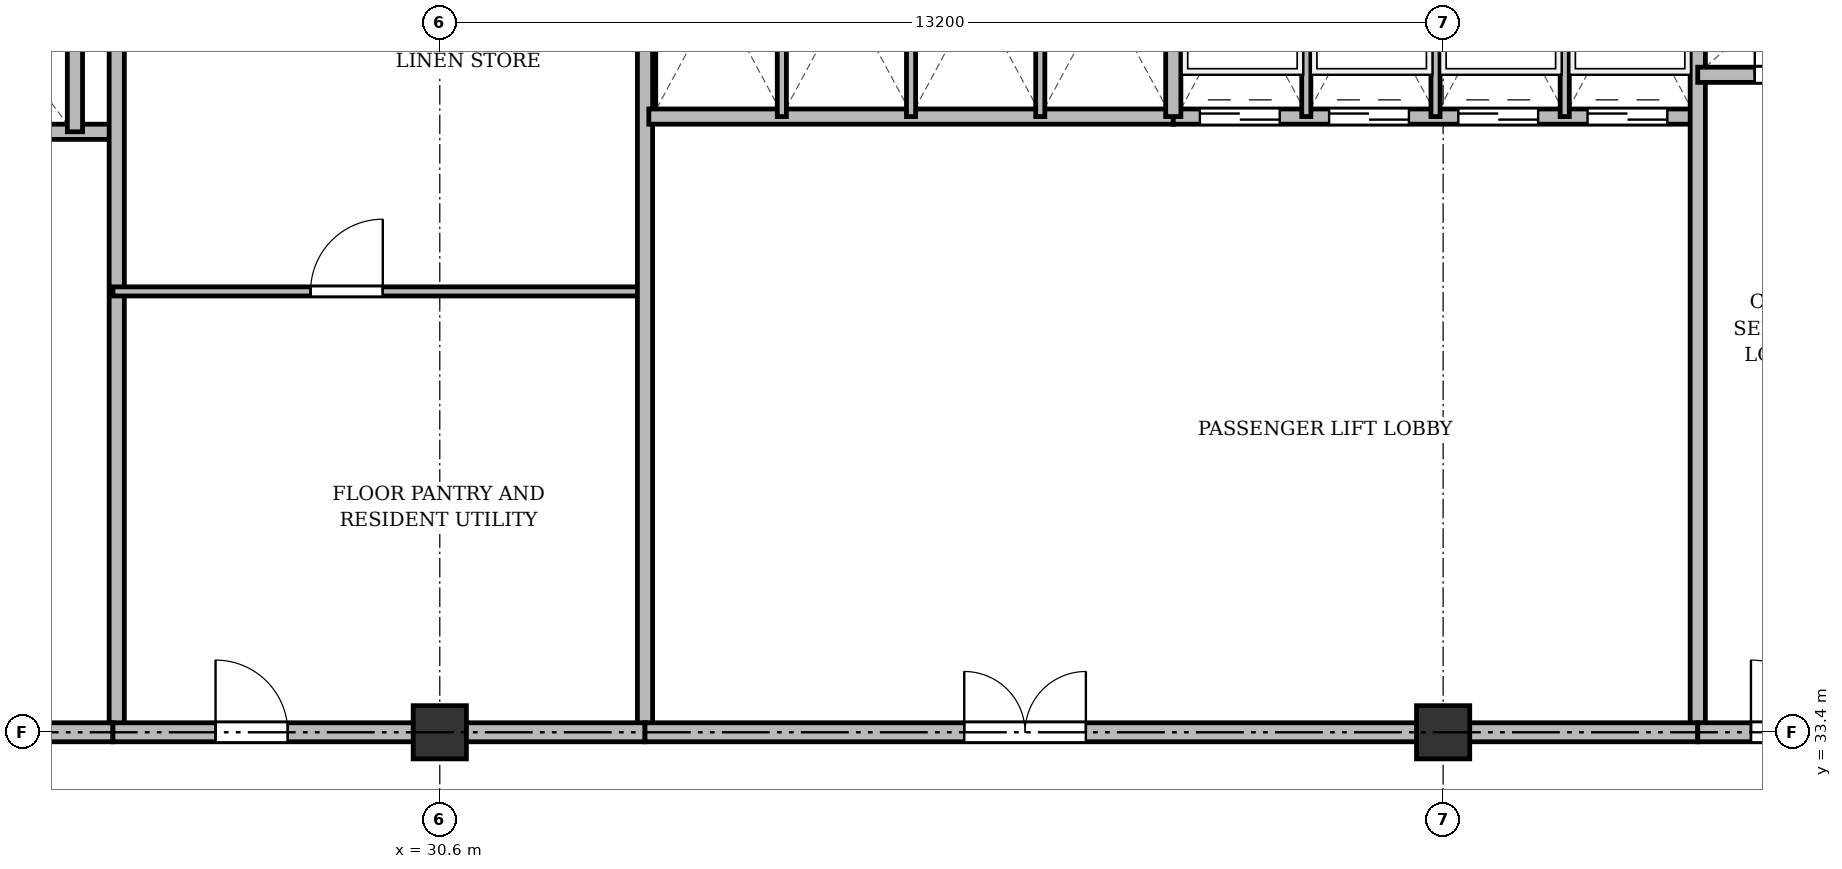
"""IFC4 building model, lengths in metres.
Left out: names, types, materials, properties, quantities, classifications, styles, units other than length and angle.
Written with IfcOpenShell. Run it as: python <this file> out.ifc"""

import sys

from ifc_helpers import new_model, si_unit, direction, frame, frame_2d, origin, origin_2d, place, context, subcontext, project, spatial, rectangle, extrude, source, transform, mapped, element, fill, save


model = new_model("IFC4")
c1 = context("Model", 3, precision=1e-05, world=origin(), true_north=direction((0.0, 1.0)))
c2 = subcontext(c1, "Body", "Model", "MODEL_VIEW")
j1 = project(units=[si_unit("LENGTHUNIT", "METRE"), si_unit("PLANEANGLEUNIT", "RADIAN")], contexts=[c1])
p1 = place(None, origin())
s1 = spatial("IfcSite", under=j1, at=p1, CompositionType="ELEMENT")
p2 = place(p1, origin())
s2 = spatial("IfcBuilding", under=s1, at=p2, CompositionType="ELEMENT")
p3 = place(p2, frame((0.0, 0.0, 219.3)))
s3 = spatial("IfcBuildingStorey", under=s2, at=p3, CompositionType="ELEMENT", Elevation=219.3)
m1 = source(origin(), c2, "Body", "SweptSolid", [
    extrude(rectangle(XDim=0.7, YDim=0.7, at=origin_2d()), origin(), (0.0, 0.0, 1.0), 3.6),
])
for number, where, z_axis, x_axis in (
    (1, (30.6, 33.4, 0.0), (0.0, 0.0, 1.0), (1.0, 0.0, 0.0)),
    (2, (43.8, 33.4, 0.0), (0.0, 0.0, 1.0), (1.0, 0.0, 0.0)),
):
    element("IfcColumn", number, at=place(p3, frame(where, z_axis=z_axis, x_axis=x_axis)), inside=s3, PredefinedType="COLUMN", context=c2, shape_type="MappedRepresentation", body=[
        mapped(m1, transform((0.0, 0.0, 0.0), x_axis=(1.0, 0.0, 0.0), y_axis=(0.0, 1.0, 0.0), z_axis=(0.0, 0.0, 1.0), scale=1.0)),
    ])
p4 = place(p3, frame((19.55, 41.3, 0.0), z_axis=(0.0, 0.0, 1.0), x_axis=(1.0, 0.0, 0.0)))
e3 = element("IfcWall", 3, at=p4, inside=s3, PredefinedType="SOLIDWALL", context=c2, shape_type="SweptSolid", body=[
    extrude(rectangle(XDim=6.75, YDim=0.2, at=frame_2d((3.375, 0.0))), origin(), (0.0, 0.0, 1.0), 3.36),
])
p5 = place(p4, frame((1.7, 0.0, 0.0)))
e4 = element("IfcOpeningElement", 4, at=p5, cuts=e3, PredefinedType="OPENING", context=c2, shape_type="SweptSolid", body=[
    extrude(rectangle(XDim=1.1, YDim=2.15, at=frame_2d((0.55, 1.075))), frame((0.0, 0.11, 0.0), z_axis=(0.0, -1.0, 0.0), x_axis=(1.0, 0.0, 0.0)), (0.0, 0.0, 1.0), 0.22),
])
p6 = place(p4, frame((4.4, 0.0, 0.0)))
e5 = element("IfcOpeningElement", 5, at=p6, cuts=e3, PredefinedType="OPENING", context=c2, shape_type="SweptSolid", body=[
    extrude(rectangle(XDim=1.1, YDim=2.15, at=frame_2d((0.55, 1.075))), frame((0.0, 0.11, 0.0), z_axis=(0.0, -1.0, 0.0), x_axis=(1.0, 0.0, 0.0)), (0.0, 0.0, 1.0), 0.22),
])
p7 = place(p3, frame((25.8, 41.3, 0.0), z_axis=(0.0, 0.0, 1.0), x_axis=(0.0, 1.0, 0.0)))
e6 = element("IfcWall", 6, at=p7, inside=s3, PredefinedType="SOLIDWALL", context=c2, shape_type="SweptSolid", body=[
    extrude(rectangle(XDim=3.4, YDim=0.2, at=frame_2d((1.7, 0.0))), origin(), (0.0, 0.0, 1.0), 3.36),
])
p8 = place(p3, frame((26.35, 33.4, 0.0), z_axis=(0.0, 0.0, 1.0), x_axis=(0.0, 1.0, 0.0)))
e7 = element("IfcWall", 7, at=p8, inside=s3, PredefinedType="SOLIDWALL", context=c2, shape_type="SweptSolid", body=[
    extrude(rectangle(XDim=11.3, YDim=0.2, at=frame_2d((5.65, 0.0))), origin(), (0.0, 0.0, 1.0), 2.91),
])
p9 = place(p3, frame((19.5, 33.4, 0.0), z_axis=(0.0, 0.0, 1.0), x_axis=(1.0, 0.0, 0.0)))
e8 = element("IfcWall", 8, at=p9, inside=s3, PredefinedType="PARTITIONING", context=c2, shape_type="SweptSolid", body=[
    extrude(rectangle(XDim=6.8, YDim=0.25, at=frame_2d((3.4, 0.0))), origin(), (0.0, 0.0, 1.0), 2.91),
])
p10 = place(p9, frame((0.75, 0.0, 0.0)))
e9 = element("IfcOpeningElement", 9, at=p10, cuts=e8, PredefinedType="OPENING", context=c2, shape_type="SweptSolid", body=[
    extrude(rectangle(XDim=1.6, YDim=2.2, at=frame_2d((0.8, 1.1))), frame((0.0, 0.135, 0.0), z_axis=(0.0, -1.0, 0.0), x_axis=(1.0, 0.0, 0.0)), (0.0, 0.0, 1.0), 0.27),
])
p11 = place(p3, frame((26.3, 39.2, 0.0), z_axis=(0.0, 0.0, 1.0), x_axis=(1.0, 0.0, 0.0)))
e10 = element("IfcWall", 10, at=p11, inside=s3, PredefinedType="PARTITIONING", context=c2, shape_type="SweptSolid", body=[
    extrude(rectangle(XDim=7.0, YDim=0.12, at=frame_2d((3.5, 0.0))), origin(), (0.0, 0.0, 1.0), 2.86),
])
p12 = place(p11, frame((2.6, 0.0, 0.0)))
e11 = element("IfcOpeningElement", 11, at=p12, cuts=e10, PredefinedType="OPENING", context=c2, shape_type="SweptSolid", body=[
    extrude(rectangle(XDim=0.95, YDim=2.15, at=frame_2d((0.475, 1.075))), frame((0.0, 0.07, 0.0), z_axis=(0.0, -1.0, 0.0), x_axis=(1.0, 0.0, 0.0)), (0.0, 0.0, 1.0), 0.14),
])
p13 = place(p3, frame((33.3, 33.4, 0.0), z_axis=(0.0, 0.0, 1.0), x_axis=(0.0, 1.0, 0.0)))
e12 = element("IfcWall", 12, at=p13, inside=s3, PredefinedType="SOLIDWALL", context=c2, shape_type="SweptSolid", body=[
    extrude(rectangle(XDim=11.3, YDim=0.2, at=frame_2d((5.65, 0.0))), origin(), (0.0, 0.0, 1.0), 2.91),
])
p14 = place(p3, frame((33.35, 41.5, 0.0), z_axis=(0.0, 0.0, 1.0), x_axis=(1.0, 0.0, 0.0)))
e13 = element("IfcWall", 13, at=p14, inside=s3, PredefinedType="SOLIDWALL", context=c2, shape_type="SweptSolid", body=[
    extrude(rectangle(XDim=6.9, YDim=0.2, at=frame_2d((3.45, 0.0))), origin(), (0.0, 0.0, 1.0), 3.36),
])
for number, where, z_axis, x_axis in (
    (14, (35.1, 41.5, 0.0), (0.0, 0.0, 1.0), (0.0, 1.0, 0.0)),
    (15, (36.8, 41.5, 0.0), (0.0, 0.0, 1.0), (0.0, 1.0, 0.0)),
    (16, (38.5, 41.5, 0.0), (0.0, 0.0, 1.0), (0.0, 1.0, 0.0)),
):
    element("IfcWall", number, at=place(p3, frame(where, z_axis=z_axis, x_axis=x_axis)), inside=s3, PredefinedType="PARTITIONING", context=c2, shape_type="SweptSolid", body=[
        extrude(rectangle(XDim=3.2, YDim=0.12, at=frame_2d((1.6, 0.0))), origin(), (0.0, 0.0, 1.0), 3.36),
    ])
p15 = place(p3, frame((40.25, 41.5, 0.0), z_axis=(0.0, 0.0, 1.0), x_axis=(1.0, 0.0, 0.0)))
e17 = element("IfcWall", 17, at=p15, inside=s3, PredefinedType="SOLIDWALL", context=c2, shape_type="SweptSolid", body=[
    extrude(rectangle(XDim=6.9, YDim=0.2, at=frame_2d((3.45, 0.0))), origin(), (0.0, 0.0, 1.0), 3.36),
])
p16 = place(p15, frame((0.35, 0.0, 0.0)))
e18 = element("IfcOpeningElement", 18, at=p16, cuts=e17, PredefinedType="OPENING", context=c2, shape_type="SweptSolid", body=[
    extrude(rectangle(XDim=1.05, YDim=2.15, at=frame_2d((0.525, 1.075))), frame((0.0, 0.11, 0.0), z_axis=(0.0, -1.0, 0.0), x_axis=(1.0, 0.0, 0.0)), (0.0, 0.0, 1.0), 0.22),
])
p17 = place(p15, frame((2.05, 0.0, 0.0)))
e19 = element("IfcOpeningElement", 19, at=p17, cuts=e17, PredefinedType="OPENING", context=c2, shape_type="SweptSolid", body=[
    extrude(rectangle(XDim=1.05, YDim=2.15, at=frame_2d((0.525, 1.075))), frame((0.0, 0.11, 0.0), z_axis=(0.0, -1.0, 0.0), x_axis=(1.0, 0.0, 0.0)), (0.0, 0.0, 1.0), 0.22),
])
p18 = place(p15, frame((3.75, 0.0, 0.0)))
e20 = element("IfcOpeningElement", 20, at=p18, cuts=e17, PredefinedType="OPENING", context=c2, shape_type="SweptSolid", body=[
    extrude(rectangle(XDim=1.05, YDim=2.15, at=frame_2d((0.525, 1.075))), frame((0.0, 0.11, 0.0), z_axis=(0.0, -1.0, 0.0), x_axis=(1.0, 0.0, 0.0)), (0.0, 0.0, 1.0), 0.22),
])
p19 = place(p15, frame((5.45, 0.0, 0.0)))
e21 = element("IfcOpeningElement", 21, at=p19, cuts=e17, PredefinedType="OPENING", context=c2, shape_type="SweptSolid", body=[
    extrude(rectangle(XDim=1.05, YDim=2.15, at=frame_2d((0.525, 1.075))), frame((0.0, 0.11, 0.0), z_axis=(0.0, -1.0, 0.0), x_axis=(1.0, 0.0, 0.0)), (0.0, 0.0, 1.0), 0.22),
])
p20 = place(p3, frame((40.25, 41.5, 0.0), z_axis=(0.0, 0.0, 1.0), x_axis=(0.0, 1.0, 0.0)))
e22 = element("IfcWall", 22, at=p20, inside=s3, PredefinedType="SOLIDWALL", context=c2, shape_type="SweptSolid", body=[
    extrude(rectangle(XDim=3.2, YDim=0.2, at=frame_2d((1.6, 0.0))), origin(), (0.0, 0.0, 1.0), 3.36),
])
for number, where, z_axis, x_axis in (
    (23, (42.0, 41.5, 0.0), (0.0, 0.0, 1.0), (0.0, 1.0, 0.0)),
    (24, (43.7, 41.5, 0.0), (0.0, 0.0, 1.0), (0.0, 1.0, 0.0)),
    (25, (45.4, 41.5, 0.0), (0.0, 0.0, 1.0), (0.0, 1.0, 0.0)),
):
    element("IfcWall", number, at=place(p3, frame(where, z_axis=z_axis, x_axis=x_axis)), inside=s3, PredefinedType="PARTITIONING", context=c2, shape_type="SweptSolid", body=[
        extrude(rectangle(XDim=3.2, YDim=0.12, at=frame_2d((1.6, 0.0))), origin(), (0.0, 0.0, 1.0), 3.36),
    ])
p21 = place(p3, frame((47.15, 33.4, 0.0), z_axis=(0.0, 0.0, 1.0), x_axis=(0.0, 1.0, 0.0)))
e26 = element("IfcWall", 26, at=p21, inside=s3, PredefinedType="SOLIDWALL", context=c2, shape_type="SweptSolid", body=[
    extrude(rectangle(XDim=11.3, YDim=0.2, at=frame_2d((5.65, 0.0))), origin(), (0.0, 0.0, 1.0), 2.91),
])
p22 = place(p3, frame((26.3, 33.4, 0.0), z_axis=(0.0, 0.0, 1.0), x_axis=(1.0, 0.0, 0.0)))
e27 = element("IfcWall", 27, at=p22, inside=s3, PredefinedType="PARTITIONING", context=c2, shape_type="SweptSolid", body=[
    extrude(rectangle(XDim=7.0, YDim=0.25, at=frame_2d((3.5, 0.0))), origin(), (0.0, 0.0, 1.0), 2.91),
])
p23 = place(p22, frame((1.35, 0.0, 0.0)))
e28 = element("IfcOpeningElement", 28, at=p23, cuts=e27, PredefinedType="OPENING", context=c2, shape_type="SweptSolid", body=[
    extrude(rectangle(XDim=0.95, YDim=2.15, at=frame_2d((0.475, 1.075))), frame((0.0, 0.135, 0.0), z_axis=(0.0, -1.0, 0.0), x_axis=(1.0, 0.0, 0.0)), (0.0, 0.0, 1.0), 0.27),
])
p24 = place(p3, frame((33.3, 33.4, 0.0), z_axis=(0.0, 0.0, 1.0), x_axis=(1.0, 0.0, 0.0)))
e29 = element("IfcWall", 29, at=p24, inside=s3, PredefinedType="PARTITIONING", context=c2, shape_type="SweptSolid", body=[
    extrude(rectangle(XDim=13.85, YDim=0.25, at=frame_2d((6.925, 0.0))), origin(), (0.0, 0.0, 1.0), 2.91),
])
p25 = place(p24, frame((4.2, 0.0, 0.0)))
e30 = element("IfcOpeningElement", 30, at=p25, cuts=e29, PredefinedType="OPENING", context=c2, shape_type="SweptSolid", body=[
    extrude(rectangle(XDim=1.6, YDim=2.2, at=frame_2d((0.8, 1.1))), frame((0.0, 0.135, 0.0), z_axis=(0.0, -1.0, 0.0), x_axis=(1.0, 0.0, 0.0)), (0.0, 0.0, 1.0), 0.27),
])
p26 = place(p3, frame((47.15, 42.05, 0.0), z_axis=(0.0, 0.0, 1.0), x_axis=(1.0, 0.0, 0.0)))
e31 = element("IfcWall", 31, at=p26, inside=s3, PredefinedType="SOLIDWALL", context=c2, shape_type="SweptSolid", body=[
    extrude(rectangle(XDim=7.85, YDim=0.2, at=frame_2d((3.925, 0.0))), origin(), (0.0, 0.0, 1.0), 2.86),
])
p27 = place(p26, frame((0.75, 0.0, 0.0)))
e32 = element("IfcOpeningElement", 32, at=p27, cuts=e31, PredefinedType="OPENING", context=c2, shape_type="SweptSolid", body=[
    extrude(rectangle(XDim=0.9, YDim=2.1, at=frame_2d((0.45, 1.05))), frame((0.0, 0.11, 0.0), z_axis=(0.0, -1.0, 0.0), x_axis=(1.0, 0.0, 0.0)), (0.0, 0.0, 1.0), 0.22),
])
p28 = place(p26, frame((3.85, 0.0, 0.0)))
e33 = element("IfcOpeningElement", 33, at=p28, cuts=e31, PredefinedType="OPENING", context=c2, shape_type="SweptSolid", body=[
    extrude(rectangle(XDim=0.9, YDim=2.1, at=frame_2d((0.45, 1.05))), frame((0.0, 0.11, 0.0), z_axis=(0.0, -1.0, 0.0), x_axis=(1.0, 0.0, 0.0)), (0.0, 0.0, 1.0), 0.22),
])
p29 = place(p3, frame((47.15, 33.4, 0.0), z_axis=(0.0, 0.0, 1.0), x_axis=(1.0, 0.0, 0.0)))
e34 = element("IfcWall", 34, at=p29, inside=s3, PredefinedType="PARTITIONING", context=c2, shape_type="SweptSolid", body=[
    extrude(rectangle(XDim=11.15, YDim=0.25, at=frame_2d((5.575, 0.0))), origin(), (0.0, 0.0, 1.0), 2.91),
])
p30 = place(p29, frame((0.7, 0.0, 0.0)))
e35 = element("IfcOpeningElement", 35, at=p30, cuts=e34, PredefinedType="OPENING", context=c2, shape_type="SweptSolid", body=[
    extrude(rectangle(XDim=0.95, YDim=2.15, at=frame_2d((0.475, 1.075))), frame((0.0, 0.135, 0.0), z_axis=(0.0, -1.0, 0.0), x_axis=(1.0, 0.0, 0.0)), (0.0, 0.0, 1.0), 0.27),
])
p31 = place(p29, frame((6.0, 0.0, 0.0)))
e36 = element("IfcOpeningElement", 36, at=p31, cuts=e34, PredefinedType="OPENING", context=c2, shape_type="SweptSolid", body=[
    extrude(rectangle(XDim=1.2, YDim=2.15, at=frame_2d((0.6, 1.075))), frame((0.0, 0.135, 0.0), z_axis=(0.0, -1.0, 0.0), x_axis=(1.0, 0.0, 0.0)), (0.0, 0.0, 1.0), 0.27),
])
m2 = source(origin(), c2, "Body", "SweptSolid", [
    extrude(rectangle(XDim=0.95, YDim=2.15, at=frame_2d((0.475, 1.075))), frame((0.0, 0.025, 0.0), z_axis=(0.0, -1.0, 0.0), x_axis=(1.0, 0.0, 0.0)), (0.0, 0.0, 1.0), 0.05),
])
p32 = place(p12, origin())
e37 = element("IfcDoor", 37, at=p32, inside=s3, OperationType="SINGLE_SWING_RIGHT", PredefinedType="DOOR", context=c2, shape_type="MappedRepresentation", body=[
    mapped(m2, transform((0.0, 0.0, 0.0), x_axis=(1.0, 0.0, 0.0), y_axis=(0.0, 1.0, 0.0), z_axis=(0.0, 0.0, 1.0), scale=1.0)),
])
fill(e11, e37)
m3 = source(origin(), c2, "Body", "SweptSolid", [
    extrude(rectangle(XDim=1.05, YDim=2.15, at=frame_2d((0.525, 1.075))), frame((0.0, 0.025, 0.0), z_axis=(0.0, -1.0, 0.0), x_axis=(1.0, 0.0, 0.0)), (0.0, 0.0, 1.0), 0.05),
])
p33 = place(p16, origin())
e38 = element("IfcDoor", 38, at=p33, inside=s3, OperationType="DOUBLE_DOOR_SLIDING", PredefinedType="DOOR", context=c2, shape_type="MappedRepresentation", body=[
    mapped(m3, transform((0.0, 0.0, 0.0), x_axis=(1.0, 0.0, 0.0), y_axis=(0.0, 1.0, 0.0), z_axis=(0.0, 0.0, 1.0), scale=1.0)),
])
fill(e18, e38)
p34 = place(p17, origin())
e39 = element("IfcDoor", 39, at=p34, inside=s3, OperationType="DOUBLE_DOOR_SLIDING", PredefinedType="DOOR", context=c2, shape_type="MappedRepresentation", body=[
    mapped(m3, transform((0.0, 0.0, 0.0), x_axis=(1.0, 0.0, 0.0), y_axis=(0.0, 1.0, 0.0), z_axis=(0.0, 0.0, 1.0), scale=1.0)),
])
fill(e19, e39)
p35 = place(p18, origin())
e40 = element("IfcDoor", 40, at=p35, inside=s3, OperationType="DOUBLE_DOOR_SLIDING", PredefinedType="DOOR", context=c2, shape_type="MappedRepresentation", body=[
    mapped(m3, transform((0.0, 0.0, 0.0), x_axis=(1.0, 0.0, 0.0), y_axis=(0.0, 1.0, 0.0), z_axis=(0.0, 0.0, 1.0), scale=1.0)),
])
fill(e20, e40)
p36 = place(p19, origin())
e41 = element("IfcDoor", 41, at=p36, inside=s3, OperationType="DOUBLE_DOOR_SLIDING", PredefinedType="DOOR", context=c2, shape_type="MappedRepresentation", body=[
    mapped(m3, transform((0.0, 0.0, 0.0), x_axis=(1.0, 0.0, 0.0), y_axis=(0.0, 1.0, 0.0), z_axis=(0.0, 0.0, 1.0), scale=1.0)),
])
fill(e21, e41)
p37 = place(p23, origin())
e42 = element("IfcDoor", 42, at=p37, inside=s3, OperationType="SINGLE_SWING_LEFT", PredefinedType="DOOR", context=c2, shape_type="MappedRepresentation", body=[
    mapped(m2, transform((0.0, 0.0, 0.0), x_axis=(1.0, 0.0, 0.0), y_axis=(0.0, 1.0, 0.0), z_axis=(0.0, 0.0, 1.0), scale=1.0)),
])
fill(e28, e42)
m4 = source(origin(), c2, "Body", "SweptSolid", [
    extrude(rectangle(XDim=1.6, YDim=2.2, at=frame_2d((0.8, 1.1))), frame((0.0, 0.025, 0.0), z_axis=(0.0, -1.0, 0.0), x_axis=(1.0, 0.0, 0.0)), (0.0, 0.0, 1.0), 0.05),
])
p38 = place(p25, origin())
e43 = element("IfcDoor", 43, at=p38, inside=s3, OperationType="DOUBLE_DOOR_SINGLE_SWING", PredefinedType="DOOR", context=c2, shape_type="MappedRepresentation", body=[
    mapped(m4, transform((0.0, 0.0, 0.0), x_axis=(1.0, 0.0, 0.0), y_axis=(0.0, 1.0, 0.0), z_axis=(0.0, 0.0, 1.0), scale=1.0)),
])
fill(e30, e43)
m5 = source(origin(), c2, "Body", "SweptSolid", [
    extrude(rectangle(XDim=0.9, YDim=2.1, at=frame_2d((0.45, 1.05))), frame((0.0, 0.025, 0.0), z_axis=(0.0, -1.0, 0.0), x_axis=(1.0, 0.0, 0.0)), (0.0, 0.0, 1.0), 0.05),
])
p39 = place(p27, origin())
e44 = element("IfcDoor", 44, at=p39, inside=s3, OperationType="SINGLE_SWING_LEFT", PredefinedType="DOOR", context=c2, shape_type="MappedRepresentation", body=[
    mapped(m5, transform((0.0, 0.0, 0.0), x_axis=(1.0, 0.0, 0.0), y_axis=(0.0, 1.0, 0.0), z_axis=(0.0, 0.0, 1.0), scale=1.0)),
])
fill(e32, e44)
p40 = place(p30, origin())
e45 = element("IfcDoor", 45, at=p40, inside=s3, OperationType="SINGLE_SWING_LEFT", PredefinedType="DOOR", context=c2, shape_type="MappedRepresentation", body=[
    mapped(m2, transform((0.0, 0.0, 0.0), x_axis=(1.0, 0.0, 0.0), y_axis=(0.0, 1.0, 0.0), z_axis=(0.0, 0.0, 1.0), scale=1.0)),
])
fill(e35, e45)
save(model, sys.argv[1])
